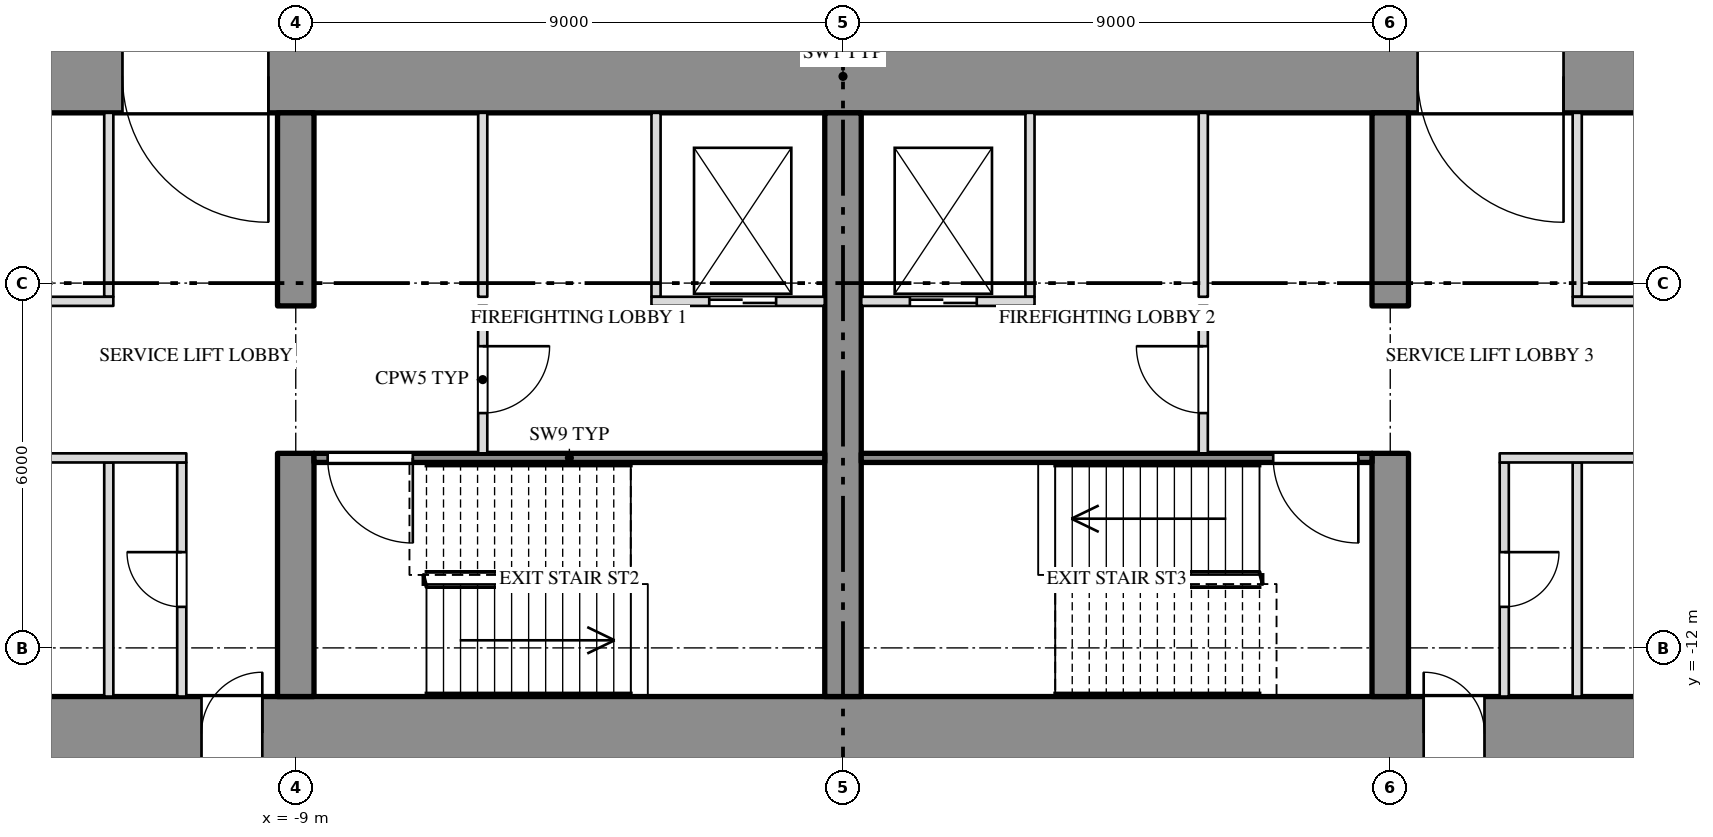
"""IFC4 building model, lengths in metres.
Left out: names, types, materials, properties, quantities, classifications, styles, units other than length and angle.
Written with IfcOpenShell. Run it as: python <this file> out.ifc"""

import sys

from ifc_helpers import new_model, si_unit, direction, frame, frame_2d, origin, place, context, subcontext, project, spatial, rectangle, extrude, element, fill, save


model = new_model("IFC4")
c1 = context("Model", 3, precision=1e-05, world=origin(), true_north=direction((0.0, 1.0)))
c2 = subcontext(c1, "Body", "Model", "MODEL_VIEW")
j1 = project(units=[si_unit("LENGTHUNIT", "METRE"), si_unit("PLANEANGLEUNIT", "RADIAN")], contexts=[c1])
p1 = place(None, origin())
s1 = spatial("IfcSite", under=j1, at=p1, CompositionType="ELEMENT")
p2 = place(p1, origin())
s2 = spatial("IfcBuilding", under=s1, at=p2, CompositionType="ELEMENT")
p3 = place(p2, frame((0.0, 0.0, -12.6)))
s3 = spatial("IfcBuildingStorey", under=s2, at=p3, CompositionType="ELEMENT", Elevation=-12.6)
p4 = place(p3, frame((-27.0, -2.6, 0.0), z_axis=(0.0, 0.0, 1.0), x_axis=(1.0, 0.0, 0.0)))
e1 = element("IfcWall", 1, at=p4, inside=s3, PredefinedType="SHEAR", context=c2, shape_type="SweptSolid", body=[
    extrude(rectangle(XDim=54.0, YDim=1.2, at=frame_2d((27.0, 0.0))), origin(), (0.0, 0.0, 1.0), 3.9),
])
p5 = place(p4, frame((15.15, 0.0, 0.0)))
e2 = element("IfcOpeningElement", 2, at=p5, cuts=e1, PredefinedType="OPENING", context=c2, shape_type="SweptSolid", body=[
    extrude(rectangle(XDim=2.4, YDim=2.1, at=frame_2d((1.2, 1.05))), frame((0.0, 0.612, 0.0), z_axis=(0.0, -1.0, 0.0), x_axis=(1.0, 0.0, 0.0)), (0.0, 0.0, 1.0), 1.224),
])
p6 = place(p4, frame((36.45, 0.0, 0.0)))
e3 = element("IfcOpeningElement", 3, at=p6, cuts=e1, PredefinedType="OPENING", context=c2, shape_type="SweptSolid", body=[
    extrude(rectangle(XDim=2.4, YDim=2.1, at=frame_2d((1.2, 1.05))), frame((0.0, 0.612, 0.0), z_axis=(0.0, -1.0, 0.0), x_axis=(1.0, 0.0, 0.0)), (0.0, 0.0, 1.0), 1.224),
])
p7 = place(p3, frame((-27.0, -13.4, 0.0), z_axis=(0.0, 0.0, 1.0), x_axis=(1.0, 0.0, 0.0)))
e4 = element("IfcWall", 4, at=p7, inside=s3, PredefinedType="SHEAR", context=c2, shape_type="SweptSolid", body=[
    extrude(rectangle(XDim=54.0, YDim=1.2, at=frame_2d((27.0, 0.0))), origin(), (0.0, 0.0, 1.0), 3.9),
])
p8 = place(p7, frame((16.45, 0.0, 0.0)))
e5 = element("IfcOpeningElement", 5, at=p8, cuts=e4, PredefinedType="OPENING", context=c2, shape_type="SweptSolid", body=[
    extrude(rectangle(XDim=1.0, YDim=2.1, at=frame_2d((0.5, 1.05))), frame((0.0, 0.612, 0.0), z_axis=(0.0, -1.0, 0.0), x_axis=(1.0, 0.0, 0.0)), (0.0, 0.0, 1.0), 1.224),
])
p9 = place(p7, frame((36.55, 0.0, 0.0)))
e6 = element("IfcOpeningElement", 6, at=p9, cuts=e4, PredefinedType="OPENING", context=c2, shape_type="SweptSolid", body=[
    extrude(rectangle(XDim=1.0, YDim=2.1, at=frame_2d((0.5, 1.05))), frame((0.0, 0.612, 0.0), z_axis=(0.0, -1.0, 0.0), x_axis=(1.0, 0.0, 0.0)), (0.0, 0.0, 1.0), 1.224),
])
p10 = place(p3, frame((-9.0, -12.8, 0.0), z_axis=(0.0, 0.0, 1.0), x_axis=(0.0, 1.0, 0.0)))
e7 = element("IfcWall", 7, at=p10, inside=s3, PredefinedType="SHEAR", context=c2, shape_type="SweptSolid", body=[
    extrude(rectangle(XDim=4.0, YDim=0.6, at=frame_2d((2.0, 0.0))), origin(), (0.0, 0.0, 1.0), 3.9),
])
p11 = place(p3, frame((-9.0, -6.375, 0.0), z_axis=(0.0, 0.0, 1.0), x_axis=(0.0, 1.0, 0.0)))
e8 = element("IfcWall", 8, at=p11, inside=s3, PredefinedType="SHEAR", context=c2, shape_type="SweptSolid", body=[
    extrude(rectangle(XDim=3.175, YDim=0.6, at=frame_2d((1.587, 0.0))), origin(), (0.0, 0.0, 1.0), 3.9),
])
p12 = place(p3, frame((0.0, -12.8, 0.0), z_axis=(0.0, 0.0, 1.0), x_axis=(0.0, 1.0, 0.0)))
e9 = element("IfcWall", 9, at=p12, inside=s3, PredefinedType="SHEAR", context=c2, shape_type="SweptSolid", body=[
    extrude(rectangle(XDim=9.6, YDim=0.6, at=frame_2d((4.8, 0.0))), origin(), (0.0, 0.0, 1.0), 3.9),
])
p13 = place(p3, frame((9.0, -12.8, 0.0), z_axis=(0.0, 0.0, 1.0), x_axis=(0.0, 1.0, 0.0)))
e10 = element("IfcWall", 10, at=p13, inside=s3, PredefinedType="SHEAR", context=c2, shape_type="SweptSolid", body=[
    extrude(rectangle(XDim=4.0, YDim=0.6, at=frame_2d((2.0, 0.0))), origin(), (0.0, 0.0, 1.0), 3.9),
])
p14 = place(p3, frame((9.0, -6.375, 0.0), z_axis=(0.0, 0.0, 1.0), x_axis=(0.0, 1.0, 0.0)))
e11 = element("IfcWall", 11, at=p14, inside=s3, PredefinedType="SHEAR", context=c2, shape_type="SweptSolid", body=[
    extrude(rectangle(XDim=3.175, YDim=0.6, at=frame_2d((1.587, 0.0))), origin(), (0.0, 0.0, 1.0), 3.9),
])
for number, where, z_axis, x_axis in (
    (12, (-12.075, -6.225, 0.0), (0.0, 0.0, 1.0), (0.0, 1.0, 0.0)),
    (13, (-3.075, -6.225, 0.0), (0.0, 0.0, 1.0), (0.0, 1.0, 0.0)),
    (14, (-5.925, -6.225, 0.0), (0.0, 0.0, 1.0), (0.0, 1.0, 0.0)),
    (15, (3.075, -6.225, 0.0), (0.0, 0.0, 1.0), (0.0, 1.0, 0.0)),
    (16, (5.925, -6.225, 0.0), (0.0, 0.0, 1.0), (0.0, 1.0, 0.0)),
    (17, (12.075, -6.225, 0.0), (0.0, 0.0, 1.0), (0.0, 1.0, 0.0)),
):
    element("IfcWall", number, at=place(p3, frame(where, z_axis=z_axis, x_axis=x_axis)), inside=s3, PredefinedType="PARTITIONING", context=c2, shape_type="SweptSolid", body=[
        extrude(rectangle(XDim=3.025, YDim=0.15, at=frame_2d((1.513, 0.0))), origin(), (0.0, 0.0, 1.0), 3.9),
    ])
p15 = place(p3, frame((-10.875, -12.8, 0.0), z_axis=(0.0, 0.0, 1.0), x_axis=(0.0, 1.0, 0.0)))
e18 = element("IfcWall", 18, at=p15, inside=s3, PredefinedType="PARTITIONING", context=c2, shape_type="SweptSolid", body=[
    extrude(rectangle(XDim=3.85, YDim=0.15, at=frame_2d((1.925, 0.0))), origin(), (0.0, 0.0, 1.0), 3.9),
])
p16 = place(p15, frame((1.475, 0.0, 0.0)))
e19 = element("IfcOpeningElement", 19, at=p16, cuts=e18, PredefinedType="OPENING", context=c2, shape_type="SweptSolid", body=[
    extrude(rectangle(XDim=0.9, YDim=2.1, at=frame_2d((0.45, 1.05))), frame((0.0, 0.087, 0.0), z_axis=(0.0, -1.0, 0.0), x_axis=(1.0, 0.0, 0.0)), (0.0, 0.0, 1.0), 0.174),
])
p17 = place(p3, frame((-12.075, -12.8, 0.0), z_axis=(0.0, 0.0, 1.0), x_axis=(0.0, 1.0, 0.0)))
e20 = element("IfcWall", 20, at=p17, inside=s3, PredefinedType="PARTITIONING", context=c2, shape_type="SweptSolid", body=[
    extrude(rectangle(XDim=3.85, YDim=0.15, at=frame_2d((1.925, 0.0))), origin(), (0.0, 0.0, 1.0), 3.9),
])
p18 = place(p3, frame((10.875, -12.8, 0.0), z_axis=(0.0, 0.0, 1.0), x_axis=(0.0, 1.0, 0.0)))
e21 = element("IfcWall", 21, at=p18, inside=s3, PredefinedType="PARTITIONING", context=c2, shape_type="SweptSolid", body=[
    extrude(rectangle(XDim=3.85, YDim=0.15, at=frame_2d((1.925, 0.0))), origin(), (0.0, 0.0, 1.0), 3.9),
])
p19 = place(p18, frame((1.475, 0.0, 0.0)))
e22 = element("IfcOpeningElement", 22, at=p19, cuts=e21, PredefinedType="OPENING", context=c2, shape_type="SweptSolid", body=[
    extrude(rectangle(XDim=0.9, YDim=2.1, at=frame_2d((0.45, 1.05))), frame((0.0, 0.087, 0.0), z_axis=(0.0, -1.0, 0.0), x_axis=(1.0, 0.0, 0.0)), (0.0, 0.0, 1.0), 0.174),
])
p20 = place(p3, frame((12.075, -12.8, 0.0), z_axis=(0.0, 0.0, 1.0), x_axis=(0.0, 1.0, 0.0)))
e23 = element("IfcWall", 23, at=p20, inside=s3, PredefinedType="PARTITIONING", context=c2, shape_type="SweptSolid", body=[
    extrude(rectangle(XDim=3.85, YDim=0.15, at=frame_2d((1.925, 0.0))), origin(), (0.0, 0.0, 1.0), 3.9),
])
p21 = place(p3, frame((-5.925, -8.8, 0.0), z_axis=(0.0, 0.0, 1.0), x_axis=(0.0, 1.0, 0.0)))
e24 = element("IfcWall", 24, at=p21, inside=s3, PredefinedType="PARTITIONING", context=c2, shape_type="SweptSolid", body=[
    extrude(rectangle(XDim=2.425, YDim=0.15, at=frame_2d((1.212, 0.0))), origin(), (0.0, 0.0, 1.0), 3.9),
])
p22 = place(p21, frame((0.662, 0.0, 0.0)))
e25 = element("IfcOpeningElement", 25, at=p22, cuts=e24, PredefinedType="OPENING", context=c2, shape_type="SweptSolid", body=[
    extrude(rectangle(XDim=1.1, YDim=2.1, at=frame_2d((0.55, 1.05))), frame((0.0, 0.087, 0.0), z_axis=(0.0, -1.0, 0.0), x_axis=(1.0, 0.0, 0.0)), (0.0, 0.0, 1.0), 0.174),
])
p23 = place(p3, frame((5.925, -8.8, 0.0), z_axis=(0.0, 0.0, 1.0), x_axis=(0.0, 1.0, 0.0)))
e26 = element("IfcWall", 26, at=p23, inside=s3, PredefinedType="PARTITIONING", context=c2, shape_type="SweptSolid", body=[
    extrude(rectangle(XDim=2.425, YDim=0.15, at=frame_2d((1.212, 0.0))), origin(), (0.0, 0.0, 1.0), 3.9),
])
p24 = place(p23, frame((0.662, 0.0, 0.0)))
e27 = element("IfcOpeningElement", 27, at=p24, cuts=e26, PredefinedType="OPENING", context=c2, shape_type="SweptSolid", body=[
    extrude(rectangle(XDim=1.1, YDim=2.1, at=frame_2d((0.55, 1.05))), frame((0.0, 0.087, 0.0), z_axis=(0.0, -1.0, 0.0), x_axis=(1.0, 0.0, 0.0)), (0.0, 0.0, 1.0), 0.174),
])
p25 = place(p3, frame((-17.7, -6.3, 0.0), z_axis=(0.0, 0.0, 1.0), x_axis=(1.0, 0.0, 0.0)))
e28 = element("IfcWall", 28, at=p25, inside=s3, PredefinedType="PARTITIONING", context=c2, shape_type="SweptSolid", body=[
    extrude(rectangle(XDim=5.7, YDim=0.15, at=frame_2d((2.85, 0.0))), origin(), (0.0, 0.0, 1.0), 3.9),
])
p26 = place(p25, frame((2.275, 0.0, 0.0)))
e29 = element("IfcOpeningElement", 29, at=p26, cuts=e28, PredefinedType="OPENING", context=c2, shape_type="SweptSolid", body=[
    extrude(rectangle(XDim=1.0, YDim=2.1, at=frame_2d((0.5, 1.05))), frame((0.0, 0.087, 0.0), z_axis=(0.0, -1.0, 0.0), x_axis=(1.0, 0.0, 0.0)), (0.0, 0.0, 1.0), 0.174),
])
p27 = place(p3, frame((-3.15, -6.3, 0.0), z_axis=(0.0, 0.0, 1.0), x_axis=(1.0, 0.0, 0.0)))
e30 = element("IfcWall", 30, at=p27, inside=s3, PredefinedType="PARTITIONING", context=c2, shape_type="SweptSolid", body=[
    extrude(rectangle(XDim=2.85, YDim=0.15, at=frame_2d((1.425, 0.0))), origin(), (0.0, 0.0, 1.0), 3.9),
])
p28 = place(p27, frame((0.95, 0.0, 0.0)))
e31 = element("IfcOpeningElement", 31, at=p28, cuts=e30, PredefinedType="OPENING", context=c2, shape_type="SweptSolid", body=[
    extrude(rectangle(XDim=1.1, YDim=2.1, at=frame_2d((0.55, 1.05))), frame((0.0, 0.087, 0.0), z_axis=(0.0, -1.0, 0.0), x_axis=(1.0, 0.0, 0.0)), (0.0, 0.0, 1.0), 0.174),
])
p29 = place(p3, frame((0.3, -6.3, 0.0), z_axis=(0.0, 0.0, 1.0), x_axis=(1.0, 0.0, 0.0)))
e32 = element("IfcWall", 32, at=p29, inside=s3, PredefinedType="PARTITIONING", context=c2, shape_type="SweptSolid", body=[
    extrude(rectangle(XDim=2.85, YDim=0.15, at=frame_2d((1.425, 0.0))), origin(), (0.0, 0.0, 1.0), 3.9),
])
p30 = place(p29, frame((0.8, 0.0, 0.0)))
e33 = element("IfcOpeningElement", 33, at=p30, cuts=e32, PredefinedType="OPENING", context=c2, shape_type="SweptSolid", body=[
    extrude(rectangle(XDim=1.1, YDim=2.1, at=frame_2d((0.55, 1.05))), frame((0.0, 0.087, 0.0), z_axis=(0.0, -1.0, 0.0), x_axis=(1.0, 0.0, 0.0)), (0.0, 0.0, 1.0), 0.174),
])
p31 = place(p3, frame((12.0, -6.3, 0.0), z_axis=(0.0, 0.0, 1.0), x_axis=(1.0, 0.0, 0.0)))
e34 = element("IfcWall", 34, at=p31, inside=s3, PredefinedType="PARTITIONING", context=c2, shape_type="SweptSolid", body=[
    extrude(rectangle(XDim=5.7, YDim=0.15, at=frame_2d((2.85, 0.0))), origin(), (0.0, 0.0, 1.0), 3.9),
])
p32 = place(p31, frame((2.425, 0.0, 0.0)))
e35 = element("IfcOpeningElement", 35, at=p32, cuts=e34, PredefinedType="OPENING", context=c2, shape_type="SweptSolid", body=[
    extrude(rectangle(XDim=1.0, YDim=2.1, at=frame_2d((0.5, 1.05))), frame((0.0, 0.087, 0.0), z_axis=(0.0, -1.0, 0.0), x_axis=(1.0, 0.0, 0.0)), (0.0, 0.0, 1.0), 0.174),
])
p33 = place(p3, frame((-17.7, -8.875, 0.0), z_axis=(0.0, 0.0, 1.0), x_axis=(1.0, 0.0, 0.0)))
e36 = element("IfcWall", 36, at=p33, inside=s3, PredefinedType="PARTITIONING", context=c2, shape_type="SweptSolid", body=[
    extrude(rectangle(XDim=6.9, YDim=0.15, at=frame_2d((3.45, 0.0))), origin(), (0.0, 0.0, 1.0), 3.9),
])
p34 = place(p33, frame((2.275, 0.0, 0.0)))
e37 = element("IfcOpeningElement", 37, at=p34, cuts=e36, PredefinedType="OPENING", context=c2, shape_type="SweptSolid", body=[
    extrude(rectangle(XDim=1.0, YDim=2.1, at=frame_2d((0.5, 1.05))), frame((0.0, 0.087, 0.0), z_axis=(0.0, -1.0, 0.0), x_axis=(1.0, 0.0, 0.0)), (0.0, 0.0, 1.0), 0.174),
])
p35 = place(p3, frame((-8.7, -8.875, 0.0), z_axis=(0.0, 0.0, 1.0), x_axis=(1.0, 0.0, 0.0)))
e38 = element("IfcWall", 38, at=p35, inside=s3, PredefinedType="SHEAR", context=c2, shape_type="SweptSolid", body=[
    extrude(rectangle(XDim=8.4, YDim=0.15, at=frame_2d((4.2, 0.0))), origin(), (0.0, 0.0, 1.0), 3.9),
])
p36 = place(p35, frame((0.225, 0.0, 0.0)))
e39 = element("IfcOpeningElement", 39, at=p36, cuts=e38, PredefinedType="OPENING", context=c2, shape_type="SweptSolid", body=[
    extrude(rectangle(XDim=1.4, YDim=2.1, at=frame_2d((0.7, 1.05))), frame((0.0, 0.087, 0.0), z_axis=(0.0, -1.0, 0.0), x_axis=(1.0, 0.0, 0.0)), (0.0, 0.0, 1.0), 0.174),
])
p37 = place(p3, frame((0.3, -8.875, 0.0), z_axis=(0.0, 0.0, 1.0), x_axis=(1.0, 0.0, 0.0)))
e40 = element("IfcWall", 40, at=p37, inside=s3, PredefinedType="SHEAR", context=c2, shape_type="SweptSolid", body=[
    extrude(rectangle(XDim=8.4, YDim=0.15, at=frame_2d((4.2, 0.0))), origin(), (0.0, 0.0, 1.0), 3.9),
])
p38 = place(p37, frame((6.775, 0.0, 0.0)))
e41 = element("IfcOpeningElement", 41, at=p38, cuts=e40, PredefinedType="OPENING", context=c2, shape_type="SweptSolid", body=[
    extrude(rectangle(XDim=1.4, YDim=2.1, at=frame_2d((0.7, 1.05))), frame((0.0, 0.087, 0.0), z_axis=(0.0, -1.0, 0.0), x_axis=(1.0, 0.0, 0.0)), (0.0, 0.0, 1.0), 0.174),
])
p39 = place(p3, frame((10.8, -8.875, 0.0), z_axis=(0.0, 0.0, 1.0), x_axis=(1.0, 0.0, 0.0)))
e42 = element("IfcWall", 42, at=p39, inside=s3, PredefinedType="PARTITIONING", context=c2, shape_type="SweptSolid", body=[
    extrude(rectangle(XDim=6.9, YDim=0.15, at=frame_2d((3.45, 0.0))), origin(), (0.0, 0.0, 1.0), 3.9),
])
p40 = place(p39, frame((3.625, 0.0, 0.0)))
e43 = element("IfcOpeningElement", 43, at=p40, cuts=e42, PredefinedType="OPENING", context=c2, shape_type="SweptSolid", body=[
    extrude(rectangle(XDim=1.0, YDim=2.1, at=frame_2d((0.5, 1.05))), frame((0.0, 0.087, 0.0), z_axis=(0.0, -1.0, 0.0), x_axis=(1.0, 0.0, 0.0)), (0.0, 0.0, 1.0), 0.174),
])
p41 = place(p16, origin())
e44 = element("IfcDoor", 44, at=p41, inside=s3, OperationType="SINGLE_SWING_RIGHT", PredefinedType="DOOR", context=c2, shape_type="SweptSolid", body=[
    extrude(rectangle(XDim=0.9, YDim=2.1, at=frame_2d((0.45, 1.05))), frame((0.0, 0.025, 0.0), z_axis=(0.0, -1.0, 0.0), x_axis=(1.0, 0.0, 0.0)), (0.0, 0.0, 1.0), 0.05),
])
fill(e19, e44)
p42 = place(p5, origin())
e45 = element("IfcDoor", 45, at=p42, inside=s3, OperationType="DOUBLE_DOOR_SINGLE_SWING", PredefinedType="DOOR", context=c2, shape_type="SweptSolid", body=[
    extrude(rectangle(XDim=2.4, YDim=2.1, at=frame_2d((1.2, 1.05))), frame((0.0, 0.025, 0.0), z_axis=(0.0, -1.0, 0.0), x_axis=(1.0, 0.0, 0.0)), (0.0, 0.0, 1.0), 0.05),
])
fill(e2, e45)
p43 = place(p8, origin())
e46 = element("IfcDoor", 46, at=p43, inside=s3, OperationType="SINGLE_SWING_RIGHT", PredefinedType="DOOR", context=c2, shape_type="SweptSolid", body=[
    extrude(rectangle(XDim=1.0, YDim=2.1, at=frame_2d((0.5, 1.05))), frame((0.0, 0.025, 0.0), z_axis=(0.0, -1.0, 0.0), x_axis=(1.0, 0.0, 0.0)), (0.0, 0.0, 1.0), 0.05),
])
fill(e5, e46)
p44 = place(p36, origin())
e47 = element("IfcDoor", 47, at=p44, inside=s3, OperationType="DOUBLE_DOOR_SINGLE_SWING", PredefinedType="DOOR", context=c2, shape_type="SweptSolid", body=[
    extrude(rectangle(XDim=1.4, YDim=2.1, at=frame_2d((0.7, 1.05))), frame((0.0, 0.025, 0.0), z_axis=(0.0, -1.0, 0.0), x_axis=(1.0, 0.0, 0.0)), (0.0, 0.0, 1.0), 0.05),
])
fill(e39, e47)
p45 = place(p22, origin())
e48 = element("IfcDoor", 48, at=p45, inside=s3, OperationType="SINGLE_SWING_LEFT", PredefinedType="DOOR", context=c2, shape_type="SweptSolid", body=[
    extrude(rectangle(XDim=1.1, YDim=2.1, at=frame_2d((0.55, 1.05))), frame((0.0, 0.025, 0.0), z_axis=(0.0, -1.0, 0.0), x_axis=(1.0, 0.0, 0.0)), (0.0, 0.0, 1.0), 0.05),
])
fill(e25, e48)
p46 = place(p28, origin())
e49 = element("IfcDoor", 49, at=p46, inside=s3, OperationType="SLIDING_TO_RIGHT", PredefinedType="DOOR", context=c2, shape_type="SweptSolid", body=[
    extrude(rectangle(XDim=1.1, YDim=2.1, at=frame_2d((0.55, 1.05))), frame((0.0, 0.025, 0.0), z_axis=(0.0, -1.0, 0.0), x_axis=(1.0, 0.0, 0.0)), (0.0, 0.0, 1.0), 0.05),
])
fill(e31, e49)
p47 = place(p30, origin())
e50 = element("IfcDoor", 50, at=p47, inside=s3, OperationType="SLIDING_TO_LEFT", PredefinedType="DOOR", context=c2, shape_type="SweptSolid", body=[
    extrude(rectangle(XDim=1.1, YDim=2.1, at=frame_2d((0.55, 1.05))), frame((0.0, 0.025, 0.0), z_axis=(0.0, -1.0, 0.0), x_axis=(1.0, 0.0, 0.0)), (0.0, 0.0, 1.0), 0.05),
])
fill(e33, e50)
p48 = place(p24, origin())
e51 = element("IfcDoor", 51, at=p48, inside=s3, OperationType="SINGLE_SWING_RIGHT", PredefinedType="DOOR", context=c2, shape_type="SweptSolid", body=[
    extrude(rectangle(XDim=1.1, YDim=2.1, at=frame_2d((0.55, 1.05))), frame((0.0, 0.025, 0.0), z_axis=(0.0, -1.0, 0.0), x_axis=(1.0, 0.0, 0.0)), (0.0, 0.0, 1.0), 0.05),
])
fill(e27, e51)
p49 = place(p38, origin())
e52 = element("IfcDoor", 52, at=p49, inside=s3, OperationType="DOUBLE_DOOR_SINGLE_SWING", PredefinedType="DOOR", context=c2, shape_type="SweptSolid", body=[
    extrude(rectangle(XDim=1.4, YDim=2.1, at=frame_2d((0.7, 1.05))), frame((0.0, 0.025, 0.0), z_axis=(0.0, -1.0, 0.0), x_axis=(1.0, 0.0, 0.0)), (0.0, 0.0, 1.0), 0.05),
])
fill(e41, e52)
p50 = place(p9, origin())
e53 = element("IfcDoor", 53, at=p50, inside=s3, OperationType="SINGLE_SWING_LEFT", PredefinedType="DOOR", context=c2, shape_type="SweptSolid", body=[
    extrude(rectangle(XDim=1.0, YDim=2.1, at=frame_2d((0.5, 1.05))), frame((0.0, 0.025, 0.0), z_axis=(0.0, -1.0, 0.0), x_axis=(1.0, 0.0, 0.0)), (0.0, 0.0, 1.0), 0.05),
])
fill(e6, e53)
p51 = place(p6, origin())
e54 = element("IfcDoor", 54, at=p51, inside=s3, OperationType="DOUBLE_DOOR_SINGLE_SWING", PredefinedType="DOOR", context=c2, shape_type="SweptSolid", body=[
    extrude(rectangle(XDim=2.4, YDim=2.1, at=frame_2d((1.2, 1.05))), frame((0.0, 0.025, 0.0), z_axis=(0.0, -1.0, 0.0), x_axis=(1.0, 0.0, 0.0)), (0.0, 0.0, 1.0), 0.05),
])
fill(e3, e54)
p52 = place(p19, origin())
e55 = element("IfcDoor", 55, at=p52, inside=s3, OperationType="SINGLE_SWING_LEFT", PredefinedType="DOOR", context=c2, shape_type="SweptSolid", body=[
    extrude(rectangle(XDim=0.9, YDim=2.1, at=frame_2d((0.45, 1.05))), frame((0.0, 0.025, 0.0), z_axis=(0.0, -1.0, 0.0), x_axis=(1.0, 0.0, 0.0)), (0.0, 0.0, 1.0), 0.05),
])
fill(e22, e55)
save(model, sys.argv[1])
